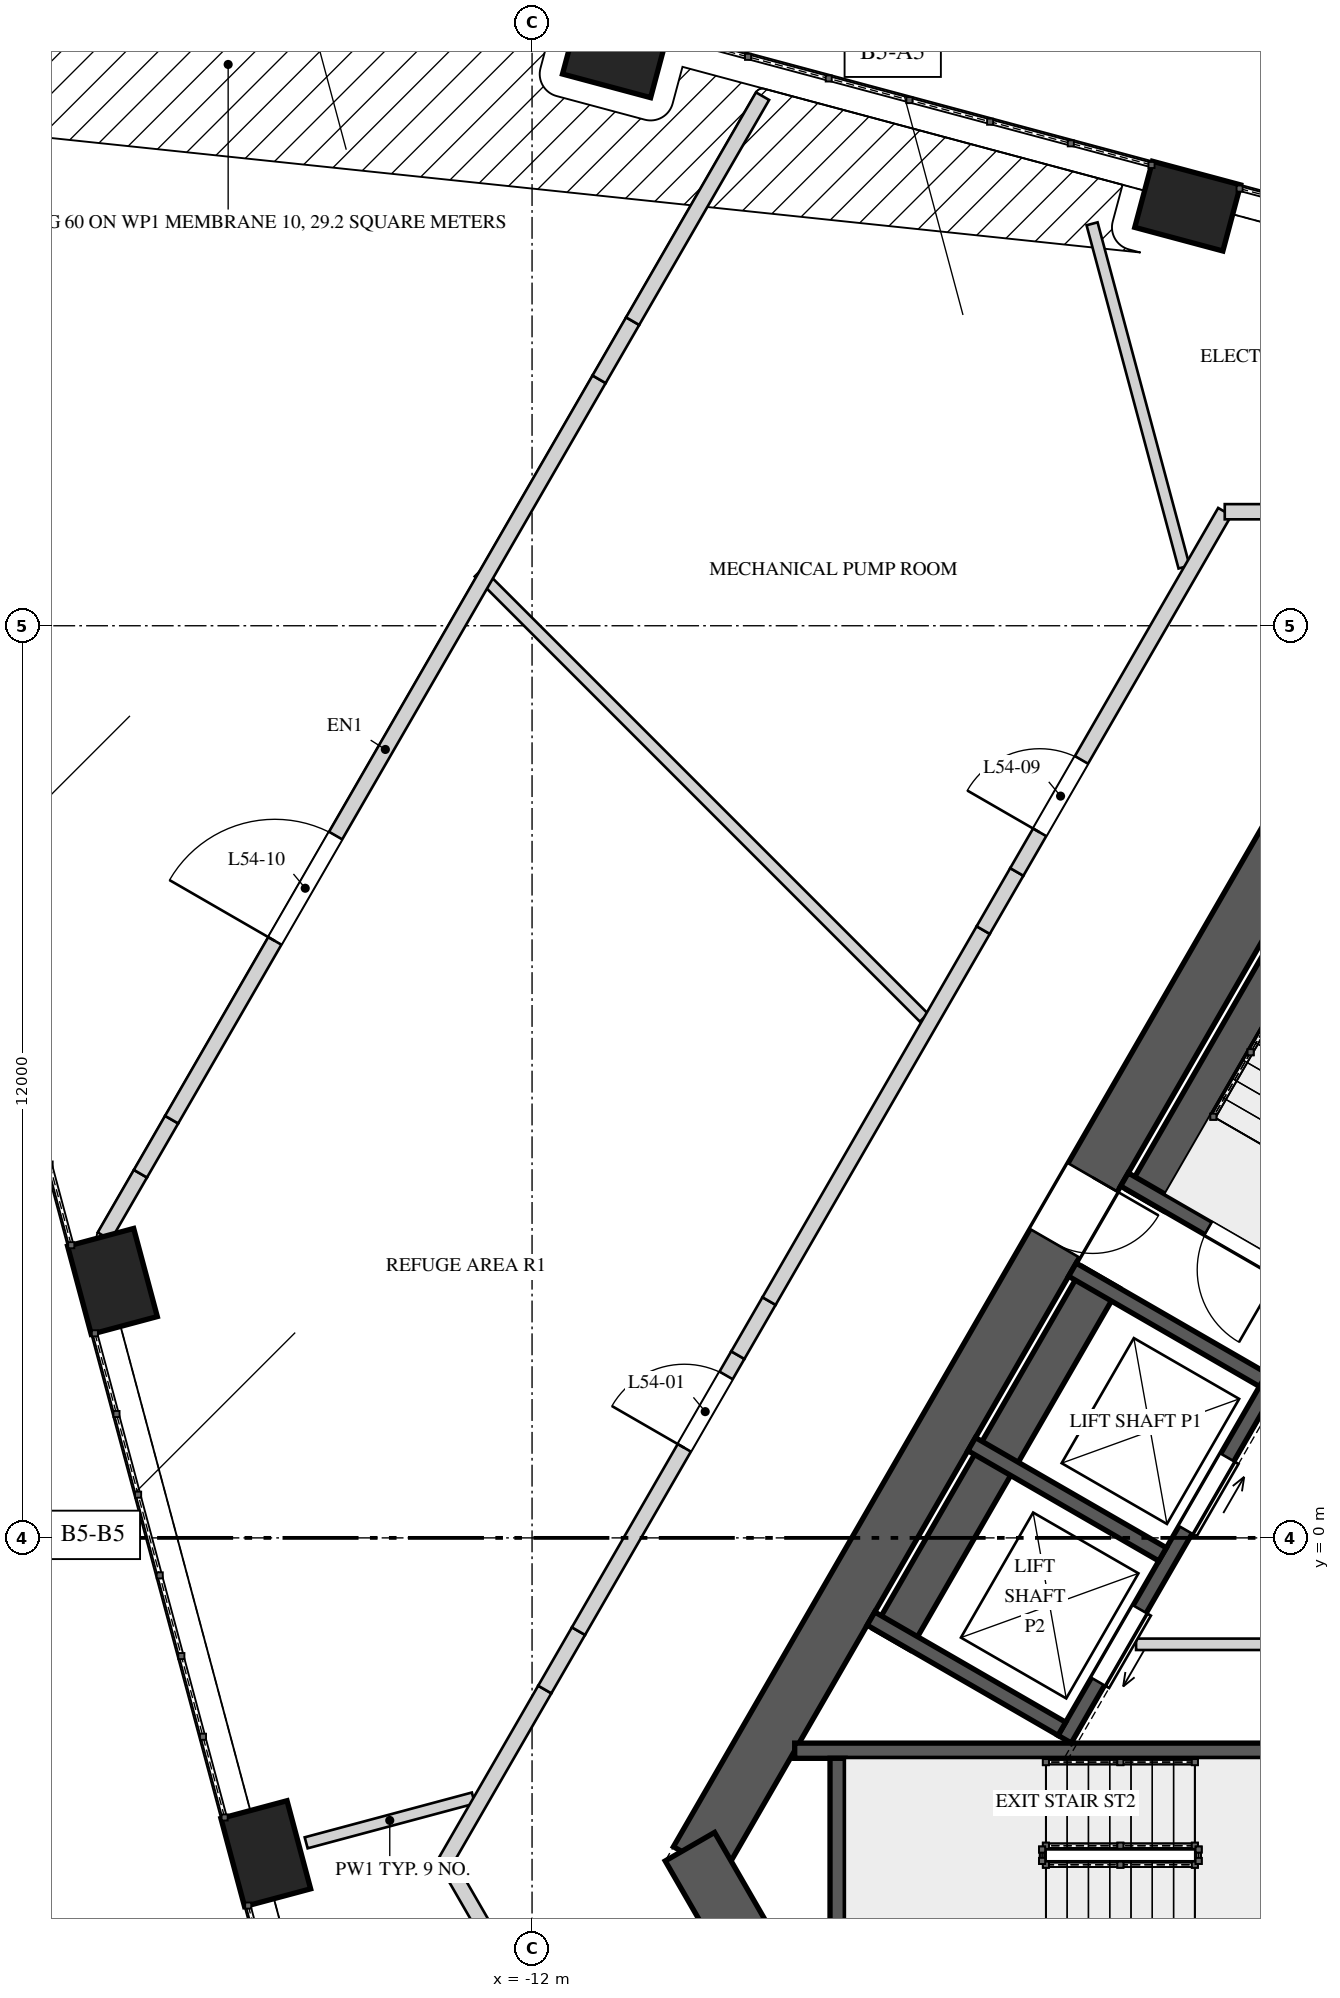
"""IFC4 building model, lengths in metres.
Left out: names, types, materials, properties, quantities, classifications, styles, units other than length and angle.
Written with IfcOpenShell. Run it as: python <this file> out.ifc"""

import sys

from ifc_helpers import new_model, si_unit, direction, frame, frame_2d, origin, origin_2d, place, context, subcontext, project, spatial, rectangle, extrude, element, fill, save


model = new_model("IFC4")
c1 = context("Model", 3, precision=1e-05, world=origin(), true_north=direction((0.0, 1.0)))
c2 = subcontext(c1, "Body", "Model", "MODEL_VIEW")
j1 = project(units=[si_unit("LENGTHUNIT", "METRE"), si_unit("PLANEANGLEUNIT", "RADIAN")], contexts=[c1])
p1 = place(None, origin())
s1 = spatial("IfcSite", under=j1, at=p1, CompositionType="ELEMENT")
p2 = place(p1, origin())
s2 = spatial("IfcBuilding", under=s1, at=p2, CompositionType="ELEMENT")
p3 = place(p2, frame((0.0, 0.0, 232.0)))
s3 = spatial("IfcBuildingStorey", under=s2, at=p3, CompositionType="ELEMENT", Elevation=232.0)
p4 = place(p3, frame((-1.227, 10.625, 0.0), z_axis=(0.0, 0.0, 1.0), x_axis=(-0.500002161919, -0.866024155596, 0.0)))
e1 = element("IfcWall", 1, at=p4, inside=s3, PredefinedType="SHEAR", context=c2, shape_type="SweptSolid", body=[
    extrude(rectangle(XDim=17.176, YDim=0.75, at=frame_2d((8.588, 0.0))), origin(), (0.0, 0.0, 1.0), 5.2),
])
p5 = place(p4, frame((6.793, 0.0, 0.0)))
e2 = element("IfcOpeningElement", 2, at=p5, cuts=e1, PredefinedType="OPENING", context=c2, shape_type="SweptSolid", body=[
    extrude(rectangle(XDim=1.0, YDim=2.4, at=frame_2d((0.5, 1.2))), frame((0.0, 0.385, 0.0), z_axis=(0.0, -1.0, 0.0), x_axis=(1.0, 0.0, 0.0)), (0.0, 0.0, 1.0), 0.77),
])
p6 = place(p3, frame((-9.923, -4.062, 0.0), z_axis=(0.0, 0.0, 1.0), x_axis=(0.499995765644, -0.866027848477, 0.0)))
e3 = element("IfcWall", 3, at=p6, inside=s3, PredefinedType="SHEAR", context=c2, shape_type="SweptSolid", body=[
    extrude(rectangle(XDim=2.887, YDim=0.75, at=frame_2d((1.443, 0.0))), origin(), (0.0, 0.0, 1.0), 5.2),
])
for number, where, z_axis, x_axis in (
    (4, (-17.521, 3.375, 0.0), (0.0, 0.0, 1.0), (0.259, -0.966, 0.0)),
    (5, (-15.503, -4.154, 0.0), (0.0, 0.0, 1.0), (0.259, -0.966, 0.0)),
    (6, (-3.375, 17.521, 0.0), (0.0, 0.0, 1.0), (-0.966, 0.259, 0.0)),
    (7, (-10.903, 19.538, 0.0), (0.0, 0.0, 1.0), (-0.966, 0.259, 0.0)),
):
    element("IfcColumn", number, at=place(p3, frame(where, z_axis=z_axis, x_axis=x_axis)), inside=s3, PredefinedType="COLUMN", context=c2, shape_type="SweptSolid", body=[
        extrude(rectangle(XDim=1.2, YDim=0.9, at=origin_2d()), origin(), (0.0, 0.0, 1.0), 2.806),
    ])
p7 = place(p3, frame((-0.831, 9.81, 0.0), z_axis=(0.0, 0.0, 1.0), x_axis=(-0.500009909098, -0.866019682689, 0.0)))
e8 = element("IfcWall", 8, at=p7, inside=s3, PredefinedType="SOLIDWALL", context=c2, shape_type="SweptSolid", body=[
    extrude(rectangle(XDim=6.2, YDim=0.55, at=frame_2d((3.1, 0.0))), origin(), (0.0, 0.0, 1.0), 4.85),
])
p8 = place(p3, frame((-1.521, 3.165, 0.0), z_axis=(0.0, 0.0, 1.0), x_axis=(-0.86600983753, 0.500026960575, 0.0)))
e9 = element("IfcWall", 9, at=p8, inside=s3, PredefinedType="SOLIDWALL", context=c2, shape_type="SweptSolid", body=[
    extrude(rectangle(XDim=3.1, YDim=0.2, at=frame_2d((1.55, 0.0))), origin(), (0.0, 0.0, 1.0), 4.85),
])
p9 = place(p8, frame((0.725, 0.0, 0.0)))
e10 = element("IfcOpeningElement", 10, at=p9, cuts=e9, PredefinedType="OPENING", context=c2, shape_type="SweptSolid", body=[
    extrude(rectangle(XDim=1.1, YDim=2.4, at=frame_2d((0.55, 1.2))), frame((0.0, 0.11, 0.0), z_axis=(0.0, -1.0, 0.0), x_axis=(1.0, 0.0, 0.0)), (0.0, 0.0, 1.0), 0.22),
])
p10 = place(p3, frame((-8.545, -2.8, 0.0), z_axis=(0.0, 0.0, 1.0), x_axis=(1.0, 0.0, 0.0)))
e11 = element("IfcWall", 11, at=p10, inside=s3, PredefinedType="SOLIDWALL", context=c2, shape_type="SweptSolid", body=[
    extrude(rectangle(XDim=6.665, YDim=0.2, at=frame_2d((3.333, 0.0))), origin(), (0.0, 0.0, 1.0), 4.85),
])
p11 = place(p3, frame((-7.98, -2.9, 0.0), z_axis=(0.0, 0.0, 1.0), x_axis=(0.0, -1.0, 0.0)))
e12 = element("IfcWall", 12, at=p11, inside=s3, PredefinedType="SOLIDWALL", context=c2, shape_type="SweptSolid", body=[
    extrude(rectangle(XDim=3.1, YDim=0.2, at=frame_2d((1.55, 0.0))), origin(), (0.0, 0.0, 1.0), 4.85),
])
p12 = place(p3, frame((-2.243, 2.115, 0.0), z_axis=(0.0, 0.0, 1.0), x_axis=(-0.499996545922, -0.866027397988, 0.0)))
e13 = element("IfcWall", 13, at=p12, inside=s3, PredefinedType="SOLIDWALL", context=c2, shape_type="SweptSolid", body=[
    extrude(rectangle(XDim=5.5, YDim=0.2, at=frame_2d((2.75, 0.0))), origin(), (0.0, 0.0, 1.0), 4.85),
])
p13 = place(p12, frame((1.22, 0.0, 0.0)))
e14 = element("IfcOpeningElement", 14, at=p13, cuts=e13, PredefinedType="OPENING", context=c2, shape_type="SweptSolid", body=[
    extrude(rectangle(XDim=1.1, YDim=2.1, at=frame_2d((0.55, 1.05))), frame((0.0, 0.11, 0.0), z_axis=(0.0, -1.0, 0.0), x_axis=(1.0, 0.0, 0.0)), (0.0, 0.0, 1.0), 0.22),
])
p14 = place(p12, frame((3.525, 0.0, 0.0)))
e15 = element("IfcOpeningElement", 15, at=p14, cuts=e13, PredefinedType="OPENING", context=c2, shape_type="SweptSolid", body=[
    extrude(rectangle(XDim=1.1, YDim=2.1, at=frame_2d((0.55, 1.05))), frame((0.0, 0.11, 0.0), z_axis=(0.0, -1.0, 0.0), x_axis=(1.0, 0.0, 0.0)), (0.0, 0.0, 1.0), 0.22),
])
p15 = place(p3, frame((-4.516, 3.427, 0.0), z_axis=(0.0, 0.0, 1.0), x_axis=(-0.499996545922, -0.866027397988, 0.0)))
e16 = element("IfcWall", 16, at=p15, inside=s3, PredefinedType="SOLIDWALL", context=c2, shape_type="SweptSolid", body=[
    extrude(rectangle(XDim=5.5, YDim=0.55, at=frame_2d((2.75, 0.0))), origin(), (0.0, 0.0, 1.0), 4.85),
])
p16 = place(p3, frame((-2.38, 2.078, 0.0), z_axis=(0.0, 0.0, 1.0), x_axis=(-0.866032775405, 0.499987231761, 0.0)))
e17 = element("IfcWall", 17, at=p16, inside=s3, PredefinedType="SOLIDWALL", context=c2, shape_type="SweptSolid", body=[
    extrude(rectangle(XDim=2.9, YDim=0.2, at=frame_2d((1.45, 0.0))), origin(), (0.0, 0.0, 1.0), 4.85),
])
p17 = place(p3, frame((-3.705, -0.217, 0.0), z_axis=(0.0, 0.0, 1.0), x_axis=(-0.865996321171, 0.50005036918, 0.0)))
e18 = element("IfcWall", 18, at=p17, inside=s3, PredefinedType="SOLIDWALL", context=c2, shape_type="SweptSolid", body=[
    extrude(rectangle(XDim=2.9, YDim=0.2, at=frame_2d((1.45, 0.0))), origin(), (0.0, 0.0, 1.0), 4.85),
])
p18 = place(p3, frame((-5.03, -2.512, 0.0), z_axis=(0.0, 0.0, 1.0), x_axis=(-0.866032775405, 0.499987231761, 0.0)))
e19 = element("IfcWall", 19, at=p18, inside=s3, PredefinedType="SOLIDWALL", context=c2, shape_type="SweptSolid", body=[
    extrude(rectangle(XDim=2.9, YDim=0.2, at=frame_2d((1.45, 0.0))), origin(), (0.0, 0.0, 1.0), 4.85),
])
p19 = place(p3, frame((-4.053, -1.4, 0.0), z_axis=(0.0, 0.0, 1.0), x_axis=(1.0, 0.0, 0.0)))
e20 = element("IfcWall", 20, at=p19, inside=s3, PredefinedType="PARTITIONING", context=c2, shape_type="SweptSolid", body=[
    extrude(rectangle(XDim=7.876, YDim=0.15, at=frame_2d((3.938, 0.0))), origin(), (0.0, 0.0, 1.0), 4.85),
])
p20 = place(p3, frame((-12.772, -3.422, 0.0), z_axis=(0.0, 0.0, 1.0), x_axis=(-0.965924600635, -0.258823619262, 0.0)))
e21 = element("IfcWall", 21, at=p20, inside=s3, PredefinedType="PARTITIONING", context=c2, shape_type="SweptSolid", body=[
    extrude(rectangle(XDim=2.277, YDim=0.15, at=frame_2d((1.139, 0.0))), origin(), (0.0, 0.0, 1.0), 4.85),
])
p21 = place(p3, frame((-12.701, 12.701, 0.0), z_axis=(0.0, 0.0, 1.0), x_axis=(0.707106781187, -0.707106781187, 0.0)))
e22 = element("IfcWall", 22, at=p21, inside=s3, PredefinedType="PARTITIONING", context=c2, shape_type="SweptSolid", body=[
    extrude(rectangle(XDim=8.282, YDim=0.15, at=frame_2d((4.141, 0.0))), origin(), (0.0, 0.0, 1.0), 4.85),
])
p22 = place(p3, frame((-3.422, 12.772, 0.0), z_axis=(0.0, 0.0, 1.0), x_axis=(-0.258806561715, 0.965929171116, 0.0)))
e23 = element("IfcWall", 23, at=p22, inside=s3, PredefinedType="PARTITIONING", context=c2, shape_type="SweptSolid", body=[
    extrude(rectangle(XDim=4.675, YDim=0.15, at=frame_2d((2.337, 0.0))), origin(), (0.0, 0.0, 1.0), 4.85),
])
p23 = place(p3, frame((-10.667, -8.525, 0.0), z_axis=(0.0, 0.0, 1.0), x_axis=(-0.500000720929, 0.866024987556, 0.0)))
e24 = element("IfcWall", 24, at=p23, inside=s3, PredefinedType="SOLIDWALL", context=c2, shape_type="SweptSolid", body=[
    extrude(rectangle(XDim=4.937, YDim=0.2, at=frame_2d((2.468, 0.0))), origin(), (0.0, 0.0, 1.0), 4.85),
])
p24 = place(p23, frame((1.5, 0.0, 0.0)))
e25 = element("IfcOpeningElement", 25, at=p24, cuts=e24, PredefinedType="OPENING", context=c2, shape_type="SweptSolid", body=[
    extrude(rectangle(XDim=1.1, YDim=2.2, at=frame_2d((0.55, 1.1))), frame((0.0, 0.11, 0.0), z_axis=(0.0, -1.0, 0.0), x_axis=(1.0, 0.0, 0.0)), (0.0, 0.0, 1.0), 0.22),
])
p25 = place(p3, frame((-13.135, -4.25, 0.0), z_axis=(0.0, 0.0, 1.0), x_axis=(0.500001094379, 0.866024771944, 0.0)))
e26 = element("IfcWall", 26, at=p25, inside=s3, PredefinedType="SOLIDWALL", context=c2, shape_type="SweptSolid", body=[
    extrude(rectangle(XDim=2.604, YDim=0.2, at=frame_2d((1.302, 0.0))), origin(), (0.0, 0.0, 1.0), 4.85),
])
p26 = place(p3, frame((-11.833, -1.995, 0.0), z_axis=(0.0, 0.0, 1.0), x_axis=(0.500016243463, 0.866016025414, 0.0)))
e27 = element("IfcWall", 27, at=p26, inside=s3, PredefinedType="SOLIDWALL", context=c2, shape_type="SweptSolid", body=[
    extrude(rectangle(XDim=0.887, YDim=0.2, at=frame_2d((0.444, 0.0))), origin(), (0.0, 0.0, 1.0), 4.15),
])
p27 = place(p3, frame((-11.389, -1.227, 0.0), z_axis=(0.0, 0.0, 1.0), x_axis=(0.499984573973, 0.866034309822, 0.0)))
e28 = element("IfcWall", 28, at=p27, inside=s3, PredefinedType="SOLIDWALL", context=c2, shape_type="SweptSolid", body=[
    extrude(rectangle(XDim=4.193, YDim=0.2, at=frame_2d((2.096, 0.0))), origin(), (0.0, 0.0, 1.0), 4.85),
])
p28 = place(p27, frame((2.784, 0.0, 0.0)))
e29 = element("IfcOpeningElement", 29, at=p28, cuts=e28, PredefinedType="OPENING", context=c2, shape_type="SweptSolid", body=[
    extrude(rectangle(XDim=1.1, YDim=2.2, at=frame_2d((0.55, 1.1))), frame((0.0, 0.11, 0.0), z_axis=(0.0, -1.0, 0.0), x_axis=(1.0, 0.0, 0.0)), (0.0, 0.0, 1.0), 0.22),
])
p29 = place(p3, frame((-9.293, 2.404, 0.0), z_axis=(0.0, 0.0, 1.0), x_axis=(0.500039835994, 0.866002403241, 0.0)))
e30 = element("IfcWall", 30, at=p29, inside=s3, PredefinedType="SOLIDWALL", context=c2, shape_type="SweptSolid", body=[
    extrude(rectangle(XDim=0.821, YDim=0.2, at=frame_2d((0.411, 0.0))), origin(), (0.0, 0.0, 1.0), 3.95),
])
p30 = place(p3, frame((-8.882, 3.115, 0.0), z_axis=(0.0, 0.0, 1.0), x_axis=(0.500006198144, 0.866021825255, 0.0)))
e31 = element("IfcWall", 31, at=p30, inside=s3, PredefinedType="SOLIDWALL", context=c2, shape_type="SweptSolid", body=[
    extrude(rectangle(XDim=5.636, YDim=0.2, at=frame_2d((2.818, 0.0))), origin(), (0.0, 0.0, 1.0), 4.85),
])
p31 = place(p3, frame((-6.064, 7.996, 0.0), z_axis=(0.0, 0.0, 1.0), x_axis=(0.499913830031, 0.866075148324, 0.0)))
e32 = element("IfcWall", 32, at=p31, inside=s3, PredefinedType="SOLIDWALL", context=c2, shape_type="SweptSolid", body=[
    extrude(rectangle(XDim=0.884, YDim=0.2, at=frame_2d((0.442, 0.0))), origin(), (0.0, 0.0, 1.0), 3.95),
])
p32 = place(p3, frame((-5.623, 8.761, 0.0), z_axis=(0.0, 0.0, 1.0), x_axis=(0.500021123982, 0.866013207504, 0.0)))
e33 = element("IfcWall", 33, at=p32, inside=s3, PredefinedType="SOLIDWALL", context=c2, shape_type="SweptSolid", body=[
    extrude(rectangle(XDim=5.472, YDim=0.2, at=frame_2d((2.736, 0.0))), origin(), (0.0, 0.0, 1.0), 4.85),
])
p33 = place(p32, frame((0.602, 0.0, 0.0)))
e34 = element("IfcOpeningElement", 34, at=p33, cuts=e33, PredefinedType="OPENING", context=c2, shape_type="SweptSolid", body=[
    extrude(rectangle(XDim=1.1, YDim=2.2, at=frame_2d((0.55, 1.1))), frame((0.0, 0.11, 0.0), z_axis=(0.0, -1.0, 0.0), x_axis=(1.0, 0.0, 0.0)), (0.0, 0.0, 1.0), 0.22),
])
p34 = place(p3, frame((-2.887, 13.5, 0.0), z_axis=(0.0, 0.0, 1.0), x_axis=(1.0, 0.0, 0.0)))
e35 = element("IfcWall", 35, at=p34, inside=s3, PredefinedType="SOLIDWALL", context=c2, shape_type="SweptSolid", body=[
    extrude(rectangle(XDim=0.837, YDim=0.2, at=frame_2d((0.418, 0.0))), origin(), (0.0, 0.0, 1.0), 4.15),
])
p35 = place(p3, frame((-17.628, 3.968, 0.0), z_axis=(0.0, 0.0, 1.0), x_axis=(0.500144919923, 0.865941718059, 0.0)))
e36 = element("IfcWall", 36, at=p35, inside=s3, PredefinedType="SOLIDWALL", context=c2, shape_type="SweptSolid", body=[
    extrude(rectangle(XDim=0.95, YDim=0.2, at=frame_2d((0.475, 0.0))), origin(), (0.0, 0.0, 1.0), 4.85),
])
p36 = place(p3, frame((-17.152, 4.791, 0.0), z_axis=(0.0, 0.0, 1.0), x_axis=(0.499911126926, 0.866076708598, 0.0)))
e37 = element("IfcWall", 37, at=p36, inside=s3, PredefinedType="SOLIDWALL", context=c2, shape_type="SweptSolid", body=[
    extrude(rectangle(XDim=0.822, YDim=0.2, at=frame_2d((0.411, 0.0))), origin(), (0.0, 0.0, 1.0), 3.95),
])
p37 = place(p3, frame((-16.742, 5.502, 0.0), z_axis=(0.0, 0.0, 1.0), x_axis=(0.499993666936, 0.86602906015, 0.0)))
e38 = element("IfcWall", 38, at=p37, inside=s3, PredefinedType="SOLIDWALL", context=c2, shape_type="SweptSolid", body=[
    extrude(rectangle(XDim=11.247, YDim=0.2, at=frame_2d((5.624, 0.0))), origin(), (0.0, 0.0, 1.0), 4.85),
])
p38 = place(p37, frame((2.715, 0.0, 0.0)))
e39 = element("IfcOpeningElement", 39, at=p38, cuts=e38, PredefinedType="OPENING", context=c2, shape_type="SweptSolid", body=[
    extrude(rectangle(XDim=1.6, YDim=2.3, at=frame_2d((0.8, 1.15))), frame((0.0, 0.11, 0.0), z_axis=(0.0, -1.0, 0.0), x_axis=(1.0, 0.0, 0.0)), (0.0, 0.0, 1.0), 0.22),
])
p39 = place(p3, frame((-11.118, 15.242, 0.0), z_axis=(0.0, 0.0, 1.0), x_axis=(0.500121072013, 0.86595549154, 0.0)))
e40 = element("IfcWall", 40, at=p39, inside=s3, PredefinedType="SOLIDWALL", context=c2, shape_type="SweptSolid", body=[
    extrude(rectangle(XDim=0.884, YDim=0.2, at=frame_2d((0.442, 0.0))), origin(), (0.0, 0.0, 1.0), 3.95),
])
p40 = place(p3, frame((-10.677, 16.008, 0.0), z_axis=(0.0, 0.0, 1.0), x_axis=(0.499988356774, 0.8660321259, 0.0)))
e41 = element("IfcWall", 41, at=p40, inside=s3, PredefinedType="SOLIDWALL", context=c2, shape_type="SweptSolid", body=[
    extrude(rectangle(XDim=3.417, YDim=0.2, at=frame_2d((1.709, 0.0))), origin(), (0.0, 0.0, 1.0), 4.85),
])
p41 = place(p9, origin())
e42 = element("IfcDoor", 42, at=p41, inside=s3, OperationType="SINGLE_SWING_RIGHT", PredefinedType="DOOR", context=c2, shape_type="SweptSolid", body=[
    extrude(rectangle(XDim=1.1, YDim=2.4, at=frame_2d((0.55, 1.2))), frame((0.0, 0.025, 0.0), z_axis=(0.0, -1.0, 0.0), x_axis=(1.0, 0.0, 0.0)), (0.0, 0.0, 1.0), 0.05),
])
fill(e10, e42)
p42 = place(p13, origin())
e43 = element("IfcDoor", 43, at=p42, inside=s3, OperationType="SLIDING_TO_LEFT", PredefinedType="DOOR", context=c2, shape_type="SweptSolid", body=[
    extrude(rectangle(XDim=1.1, YDim=2.1, at=frame_2d((0.55, 1.05))), frame((0.0, 0.025, 0.0), z_axis=(0.0, -1.0, 0.0), x_axis=(1.0, 0.0, 0.0)), (0.0, 0.0, 1.0), 0.05),
])
fill(e14, e43)
p43 = place(p14, origin())
e44 = element("IfcDoor", 44, at=p43, inside=s3, OperationType="SLIDING_TO_RIGHT", PredefinedType="DOOR", context=c2, shape_type="SweptSolid", body=[
    extrude(rectangle(XDim=1.1, YDim=2.1, at=frame_2d((0.55, 1.05))), frame((0.0, 0.025, 0.0), z_axis=(0.0, -1.0, 0.0), x_axis=(1.0, 0.0, 0.0)), (0.0, 0.0, 1.0), 0.05),
])
fill(e15, e44)
p44 = place(p5, origin())
e45 = element("IfcDoor", 45, at=p44, inside=s3, OperationType="SINGLE_SWING_RIGHT", PredefinedType="DOOR", context=c2, shape_type="SweptSolid", body=[
    extrude(rectangle(XDim=1.0, YDim=2.4, at=frame_2d((0.5, 1.2))), frame((0.0, 0.025, 0.0), z_axis=(0.0, -1.0, 0.0), x_axis=(1.0, 0.0, 0.0)), (0.0, 0.0, 1.0), 0.05),
])
fill(e2, e45)
p45 = place(p28, origin())
e46 = element("IfcDoor", 46, at=p45, inside=s3, OperationType="SINGLE_SWING_LEFT", PredefinedType="DOOR", context=c2, shape_type="SweptSolid", body=[
    extrude(rectangle(XDim=1.1, YDim=2.2, at=frame_2d((0.55, 1.1))), frame((0.0, 0.025, 0.0), z_axis=(0.0, -1.0, 0.0), x_axis=(1.0, 0.0, 0.0)), (0.0, 0.0, 1.0), 0.05),
])
fill(e29, e46)
p46 = place(p33, origin())
e47 = element("IfcDoor", 47, at=p46, inside=s3, OperationType="SINGLE_SWING_LEFT", PredefinedType="DOOR", context=c2, shape_type="SweptSolid", body=[
    extrude(rectangle(XDim=1.1, YDim=2.2, at=frame_2d((0.55, 1.1))), frame((0.0, 0.025, 0.0), z_axis=(0.0, -1.0, 0.0), x_axis=(1.0, 0.0, 0.0)), (0.0, 0.0, 1.0), 0.05),
])
fill(e34, e47)
p47 = place(p38, origin())
e48 = element("IfcDoor", 48, at=p47, inside=s3, OperationType="DOUBLE_DOOR_SINGLE_SWING", PredefinedType="DOOR", context=c2, shape_type="SweptSolid", body=[
    extrude(rectangle(XDim=1.6, YDim=2.3, at=frame_2d((0.8, 1.15))), frame((0.0, 0.025, 0.0), z_axis=(0.0, -1.0, 0.0), x_axis=(1.0, 0.0, 0.0)), (0.0, 0.0, 1.0), 0.05),
])
fill(e39, e48)
save(model, sys.argv[1])
